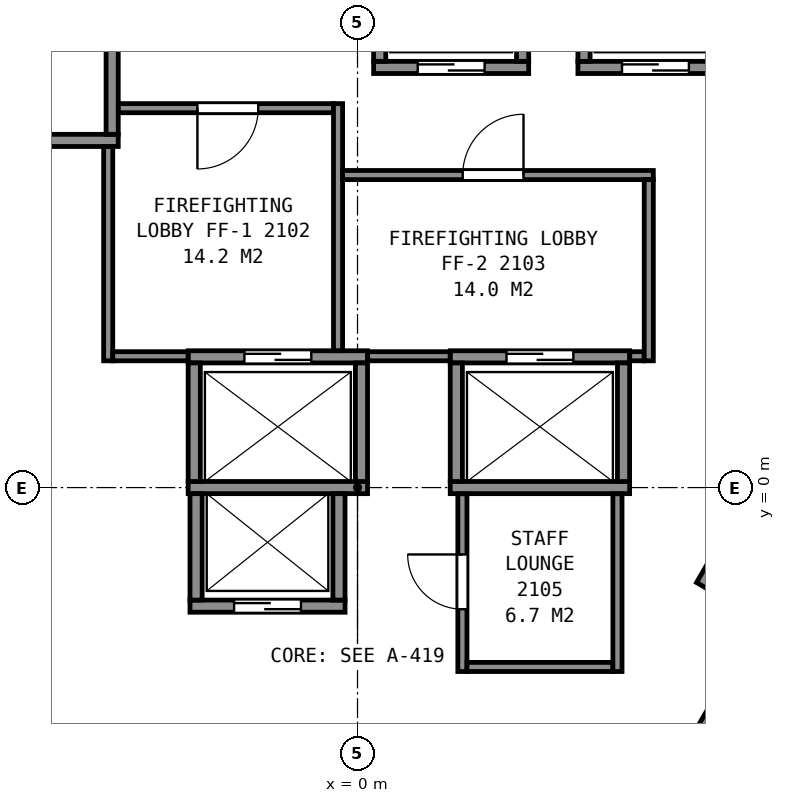
"""IFC4 building model, lengths in metres.
Left out: names, types, materials, properties, quantities, classifications, styles, units other than length and angle.
Written with IfcOpenShell. Run it as: python <this file> out.ifc"""

import sys

from ifc_helpers import new_model, si_unit, direction, frame, frame_2d, origin, place, context, subcontext, project, spatial, rectangle, extrude, element, fill, save


model = new_model("IFC4")
c1 = context("Model", 3, precision=1e-05, world=origin(), true_north=direction((0.0, 1.0)))
c2 = subcontext(c1, "Body", "Model", "MODEL_VIEW")
j1 = project(units=[si_unit("LENGTHUNIT", "METRE"), si_unit("PLANEANGLEUNIT", "RADIAN")], contexts=[c1])
p1 = place(None, origin())
s1 = spatial("IfcSite", under=j1, at=p1, CompositionType="ELEMENT")
p2 = place(p1, origin())
s2 = spatial("IfcBuilding", under=s1, at=p2, CompositionType="ELEMENT")
p3 = place(p2, frame((0.0, 0.0, 92.8)))
s3 = spatial("IfcBuildingStorey", under=s2, at=p3, CompositionType="ELEMENT", Elevation=92.8)
p4 = place(p3, frame((-2.755, -1.95, 0.0), z_axis=(0.0, 0.0, 1.0), x_axis=(1.0, 0.0, 0.0)))
e1 = element("IfcWall", 1, at=p4, inside=s3, PredefinedType="PARTITIONING", context=c2, shape_type="SweptSolid", body=[
    extrude(rectangle(XDim=2.55, YDim=0.2, at=frame_2d((1.275, 0.0))), origin(), (0.0, 0.0, 1.0), 3.6),
])
p5 = place(p4, frame((0.725, 0.0, 0.0)))
e2 = element("IfcOpeningElement", 2, at=p5, cuts=e1, PredefinedType="OPENING", context=c2, shape_type="SweptSolid", body=[
    extrude(rectangle(XDim=1.1, YDim=2.1, at=frame_2d((0.55, 1.05))), frame((0.0, 0.11, 0.0), z_axis=(0.0, -1.0, 0.0), x_axis=(1.0, 0.0, 0.0)), (0.0, 0.0, 1.0), 0.22),
])
p6 = place(p3, frame((-2.785, 0.0, 0.0), z_axis=(0.0, 0.0, 1.0), x_axis=(1.0, 0.0, 0.0)))
e3 = element("IfcWall", 3, at=p6, inside=s3, PredefinedType="PARTITIONING", context=c2, shape_type="SweptSolid", body=[
    extrude(rectangle(XDim=2.95, YDim=0.2, at=frame_2d((1.475, 0.0))), origin(), (0.0, 0.0, 1.0), 3.6),
])
p7 = place(p3, frame((1.525, 0.0, 0.0), z_axis=(0.0, 0.0, 1.0), x_axis=(1.0, 0.0, 0.0)))
e4 = element("IfcWall", 4, at=p7, inside=s3, PredefinedType="PARTITIONING", context=c2, shape_type="SweptSolid", body=[
    extrude(rectangle(XDim=2.95, YDim=0.2, at=frame_2d((1.475, 0.0))), origin(), (0.0, 0.0, 1.0), 3.6),
])
p8 = place(p3, frame((-2.785, 2.15, 0.0), z_axis=(0.0, 0.0, 1.0), x_axis=(1.0, 0.0, 0.0)))
e5 = element("IfcWall", 5, at=p8, inside=s3, PredefinedType="PARTITIONING", context=c2, shape_type="SweptSolid", body=[
    extrude(rectangle(XDim=2.95, YDim=0.2, at=frame_2d((1.475, 0.0))), origin(), (0.0, 0.0, 1.0), 3.6),
])
p9 = place(p8, frame((0.925, 0.0, 0.0)))
e6 = element("IfcOpeningElement", 6, at=p9, cuts=e5, PredefinedType="OPENING", context=c2, shape_type="SweptSolid", body=[
    extrude(rectangle(XDim=1.1, YDim=2.1, at=frame_2d((0.55, 1.05))), frame((0.0, 0.11, 0.0), z_axis=(0.0, -1.0, 0.0), x_axis=(1.0, 0.0, 0.0)), (0.0, 0.0, 1.0), 0.22),
])
p10 = place(p3, frame((1.525, 2.15, 0.0), z_axis=(0.0, 0.0, 1.0), x_axis=(1.0, 0.0, 0.0)))
e7 = element("IfcWall", 7, at=p10, inside=s3, PredefinedType="PARTITIONING", context=c2, shape_type="SweptSolid", body=[
    extrude(rectangle(XDim=2.95, YDim=0.2, at=frame_2d((1.475, 0.0))), origin(), (0.0, 0.0, 1.0), 3.6),
])
p11 = place(p10, frame((0.925, 0.0, 0.0)))
e8 = element("IfcOpeningElement", 8, at=p11, cuts=e7, PredefinedType="OPENING", context=c2, shape_type="SweptSolid", body=[
    extrude(rectangle(XDim=1.1, YDim=2.1, at=frame_2d((0.55, 1.05))), frame((0.0, 0.11, 0.0), z_axis=(0.0, -1.0, 0.0), x_axis=(1.0, 0.0, 0.0)), (0.0, 0.0, 1.0), 0.22),
])
p12 = place(p3, frame((-6.285, 5.71, 0.0), z_axis=(0.0, 0.0, 1.0), x_axis=(1.0, 0.0, 0.0)))
e9 = element("IfcWall", 9, at=p12, inside=s3, PredefinedType="PARTITIONING", context=c2, shape_type="SweptSolid", body=[
    extrude(rectangle(XDim=2.35, YDim=0.2, at=frame_2d((1.175, 0.0))), origin(), (0.0, 0.0, 1.0), 3.6),
])
p13 = place(p3, frame((0.265, 6.91, 0.0), z_axis=(0.0, 0.0, 1.0), x_axis=(1.0, 0.0, 0.0)))
e10 = element("IfcWall", 10, at=p13, inside=s3, PredefinedType="PARTITIONING", context=c2, shape_type="SweptSolid", body=[
    extrude(rectangle(XDim=2.55, YDim=0.2, at=frame_2d((1.275, 0.0))), origin(), (0.0, 0.0, 1.0), 3.6),
])
p14 = place(p13, frame((0.725, 0.0, 0.0)))
e11 = element("IfcOpeningElement", 11, at=p14, cuts=e10, PredefinedType="OPENING", context=c2, shape_type="SweptSolid", body=[
    extrude(rectangle(XDim=1.1, YDim=2.1, at=frame_2d((0.55, 1.05))), frame((0.0, 0.11, 0.0), z_axis=(0.0, -1.0, 0.0), x_axis=(1.0, 0.0, 0.0)), (0.0, 0.0, 1.0), 0.22),
])
p15 = place(p3, frame((3.625, 6.91, 0.0), z_axis=(0.0, 0.0, 1.0), x_axis=(1.0, 0.0, 0.0)))
e12 = element("IfcWall", 12, at=p15, inside=s3, PredefinedType="PARTITIONING", context=c2, shape_type="SweptSolid", body=[
    extrude(rectangle(XDim=2.55, YDim=0.2, at=frame_2d((1.275, 0.0))), origin(), (0.0, 0.0, 1.0), 3.6),
])
p16 = place(p15, frame((0.725, 0.0, 0.0)))
e13 = element("IfcOpeningElement", 13, at=p16, cuts=e12, PredefinedType="OPENING", context=c2, shape_type="SweptSolid", body=[
    extrude(rectangle(XDim=1.1, YDim=2.1, at=frame_2d((0.55, 1.05))), frame((0.0, 0.11, 0.0), z_axis=(0.0, -1.0, 0.0), x_axis=(1.0, 0.0, 0.0)), (0.0, 0.0, 1.0), 0.22),
])
p17 = place(p3, frame((5.527, -4.247, 0.0), z_axis=(0.0, 0.0, 1.0), x_axis=(0.499938297808, 0.866061024631, 0.0)))
e14 = element("IfcWall", 14, at=p17, inside=s3, PredefinedType="PARTITIONING", context=c2, shape_type="SweptSolid", body=[
    extrude(rectangle(XDim=2.35, YDim=0.2, at=frame_2d((1.175, 0.0))), origin(), (0.0, 0.0, 1.0), 3.6),
])
p18 = place(p17, frame((0.725, 0.0, 0.0)))
e15 = element("IfcOpeningElement", 15, at=p18, cuts=e14, PredefinedType="OPENING", context=c2, shape_type="SweptSolid", body=[
    extrude(rectangle(XDim=1.1, YDim=2.1, at=frame_2d((0.55, 1.05))), frame((0.0, 0.11, 0.0), z_axis=(0.0, -1.0, 0.0), x_axis=(1.0, 0.0, 0.0)), (0.0, 0.0, 1.0), 0.22),
])
p19 = place(p3, frame((5.663, -1.612, 0.0), z_axis=(0.0, 0.0, 1.0), x_axis=(0.49998122708, 0.866036242063, 0.0)))
e16 = element("IfcWall", 16, at=p19, inside=s3, PredefinedType="PARTITIONING", context=c2, shape_type="SweptSolid", body=[
    extrude(rectangle(XDim=4.9, YDim=0.2, at=frame_2d((2.45, 0.0))), origin(), (0.0, 0.0, 1.0), 3.6),
])
p20 = place(p3, frame((4.375, 0.1, 0.0), z_axis=(0.0, 0.0, 1.0), x_axis=(0.0, 1.0, 0.0)))
e17 = element("IfcWall", 17, at=p20, inside=s3, PredefinedType="PARTITIONING", context=c2, shape_type="SweptSolid", body=[
    extrude(rectangle(XDim=1.95, YDim=0.2, at=frame_2d((0.975, 0.0))), origin(), (0.0, 0.0, 1.0), 3.6),
])
for number, where, z_axis, x_axis in (
    (18, (3.725, 7.01, 0.0), (0.0, 0.0, 1.0), (0.0, 1.0, 0.0)),
    (19, (2.715, 7.01, 0.0), (0.0, 0.0, 1.0), (0.0, 1.0, 0.0)),
):
    element("IfcWall", number, at=place(p3, frame(where, z_axis=z_axis, x_axis=x_axis)), inside=s3, PredefinedType="PARTITIONING", context=c2, shape_type="SweptSolid", body=[
        extrude(rectangle(XDim=1.75, YDim=0.2, at=frame_2d((0.875, 0.0))), origin(), (0.0, 0.0, 1.0), 3.6),
    ])
p21 = place(p3, frame((1.625, 0.1, 0.0), z_axis=(0.0, 0.0, 1.0), x_axis=(0.0, 1.0, 0.0)))
e20 = element("IfcWall", 20, at=p21, inside=s3, PredefinedType="PARTITIONING", context=c2, shape_type="SweptSolid", body=[
    extrude(rectangle(XDim=1.95, YDim=0.2, at=frame_2d((0.975, 0.0))), origin(), (0.0, 0.0, 1.0), 3.6),
])
p22 = place(p3, frame((0.365, 7.01, 0.0), z_axis=(0.0, 0.0, 1.0), x_axis=(0.0, 1.0, 0.0)))
e21 = element("IfcWall", 21, at=p22, inside=s3, PredefinedType="PARTITIONING", context=c2, shape_type="SweptSolid", body=[
    extrude(rectangle(XDim=1.75, YDim=0.2, at=frame_2d((0.875, 0.0))), origin(), (0.0, 0.0, 1.0), 3.6),
])
p23 = place(p3, frame((0.065, 0.1, 0.0), z_axis=(0.0, 0.0, 1.0), x_axis=(0.0, 1.0, 0.0)))
e22 = element("IfcWall", 22, at=p23, inside=s3, PredefinedType="PARTITIONING", context=c2, shape_type="SweptSolid", body=[
    extrude(rectangle(XDim=1.95, YDim=0.2, at=frame_2d((0.975, 0.0))), origin(), (0.0, 0.0, 1.0), 3.6),
])
for number, where, z_axis, x_axis in (
    (23, (-0.305, -1.85, 0.0), (0.0, 0.0, 1.0), (0.0, 1.0, 0.0)),
    (24, (-2.655, -1.85, 0.0), (0.0, 0.0, 1.0), (0.0, 1.0, 0.0)),
):
    element("IfcWall", number, at=place(p3, frame(where, z_axis=z_axis, x_axis=x_axis)), inside=s3, PredefinedType="PARTITIONING", context=c2, shape_type="SweptSolid", body=[
        extrude(rectangle(XDim=1.75, YDim=0.2, at=frame_2d((0.875, 0.0))), origin(), (0.0, 0.0, 1.0), 3.6),
    ])
p24 = place(p3, frame((-2.685, 0.1, 0.0), z_axis=(0.0, 0.0, 1.0), x_axis=(0.0, 1.0, 0.0)))
e25 = element("IfcWall", 25, at=p24, inside=s3, PredefinedType="PARTITIONING", context=c2, shape_type="SweptSolid", body=[
    extrude(rectangle(XDim=1.95, YDim=0.2, at=frame_2d((0.975, 0.0))), origin(), (0.0, 0.0, 1.0), 3.6),
])
p25 = place(p3, frame((-4.035, 5.81, 0.0), z_axis=(0.0, 0.0, 1.0), x_axis=(0.0, 1.0, 0.0)))
e26 = element("IfcWall", 26, at=p25, inside=s3, PredefinedType="PARTITIONING", context=c2, shape_type="SweptSolid", body=[
    extrude(rectangle(XDim=1.75, YDim=0.2, at=frame_2d((0.875, 0.0))), origin(), (0.0, 0.0, 1.0), 3.6),
])
p26 = place(p3, frame((-13.664, 5.946, 0.0), z_axis=(0.0, 0.0, 1.0), x_axis=(0.499994327219, -0.866028678941, 0.0)))
e27 = element("IfcWall", 27, at=p26, inside=s3, PredefinedType="PARTITIONING", context=c2, shape_type="SweptSolid", body=[
    extrude(rectangle(XDim=23.968, YDim=0.2, at=frame_2d((11.984, 0.0))), origin(), (0.0, 0.0, 1.0), 3.35),
])
p27 = place(p3, frame((-4.278, -5.512, 0.0), z_axis=(0.0, 0.0, 1.0), x_axis=(-0.499933120428, 0.86606401328, 0.0)))
e28 = element("IfcWall", 28, at=p27, inside=s3, PredefinedType="PARTITIONING", context=c2, shape_type="SweptSolid", body=[
    extrude(rectangle(XDim=3.377, YDim=0.15, at=frame_2d((1.689, 0.0))), origin(), (0.0, 0.0, 1.0), 3.35),
])
p28 = place(p27, frame((2.177, 0.0, 0.0)))
e29 = element("IfcOpeningElement", 29, at=p28, cuts=e28, PredefinedType="OPENING", context=c2, shape_type="SweptSolid", body=[
    extrude(rectangle(XDim=0.9, YDim=2.1, at=frame_2d((0.45, 1.05))), frame((0.0, 0.085, 0.0), z_axis=(0.0, -1.0, 0.0), x_axis=(1.0, 0.0, 0.0)), (0.0, 0.0, 1.0), 0.17),
])
p29 = place(p27, frame((0.525, 0.0, 0.0)))
e30 = element("IfcOpeningElement", 30, at=p29, cuts=e28, PredefinedType="OPENING", context=c2, shape_type="SweptSolid", body=[
    extrude(rectangle(XDim=0.9, YDim=2.1, at=frame_2d((0.45, 1.05))), frame((0.0, 0.085, 0.0), z_axis=(0.0, -1.0, 0.0), x_axis=(1.0, 0.0, 0.0)), (0.0, 0.0, 1.0), 0.17),
])
p30 = place(p3, frame((-4.1, 2.085, 0.0), z_axis=(0.0, 0.0, 1.0), x_axis=(0.0, 1.0, 0.0)))
e31 = element("IfcWall", 31, at=p30, inside=s3, PredefinedType="PARTITIONING", context=c2, shape_type="SweptSolid", body=[
    extrude(rectangle(XDim=3.523, YDim=0.15, at=frame_2d((1.761, 0.0))), origin(), (0.0, 0.0, 1.0), 3.35),
])
p31 = place(p3, frame((-4.025, 2.16, 0.0), z_axis=(0.0, 0.0, 1.0), x_axis=(1.0, 0.0, 0.0)))
e32 = element("IfcWall", 32, at=p31, inside=s3, PredefinedType="PARTITIONING", context=c2, shape_type="SweptSolid", body=[
    extrude(rectangle(XDim=1.238, YDim=0.15, at=frame_2d((0.619, 0.0))), origin(), (0.0, 0.0, 1.0), 3.35),
])
p32 = place(p3, frame((-3.933, 6.24, 0.0), z_axis=(0.0, 0.0, 1.0), x_axis=(1.0, 0.0, 0.0)))
e33 = element("IfcWall", 33, at=p32, inside=s3, PredefinedType="PARTITIONING", context=c2, shape_type="SweptSolid", body=[
    extrude(rectangle(XDim=3.538, YDim=0.15, at=frame_2d((1.769, 0.0))), origin(), (0.0, 0.0, 1.0), 3.35),
])
p33 = place(p32, frame((1.3, 0.0, 0.0)))
e34 = element("IfcOpeningElement", 34, at=p33, cuts=e33, PredefinedType="OPENING", context=c2, shape_type="SweptSolid", body=[
    extrude(rectangle(XDim=1.0, YDim=2.1, at=frame_2d((0.5, 1.05))), frame((0.0, 0.085, 0.0), z_axis=(0.0, -1.0, 0.0), x_axis=(1.0, 0.0, 0.0)), (0.0, 0.0, 1.0), 0.17),
])
p34 = place(p3, frame((-0.32, 2.252, 0.0), z_axis=(0.0, 0.0, 1.0), x_axis=(0.0, 1.0, 0.0)))
e35 = element("IfcWall", 35, at=p34, inside=s3, PredefinedType="PARTITIONING", context=c2, shape_type="SweptSolid", body=[
    extrude(rectangle(XDim=4.063, YDim=0.15, at=frame_2d((2.031, 0.0))), origin(), (0.0, 0.0, 1.0), 3.35),
])
p35 = place(p3, frame((-0.245, 5.14, 0.0), z_axis=(0.0, 0.0, 1.0), x_axis=(1.0, 0.0, 0.0)))
e36 = element("IfcWall", 36, at=p35, inside=s3, PredefinedType="PARTITIONING", context=c2, shape_type="SweptSolid", body=[
    extrude(rectangle(XDim=5.11, YDim=0.15, at=frame_2d((2.555, 0.0))), origin(), (0.0, 0.0, 1.0), 3.35),
])
p36 = place(p35, frame((1.975, 0.0, 0.0)))
e37 = element("IfcOpeningElement", 37, at=p36, cuts=e36, PredefinedType="OPENING", context=c2, shape_type="SweptSolid", body=[
    extrude(rectangle(XDim=1.0, YDim=2.1, at=frame_2d((0.5, 1.05))), frame((0.0, 0.085, 0.0), z_axis=(0.0, -1.0, 0.0), x_axis=(1.0, 0.0, 0.0)), (0.0, 0.0, 1.0), 0.17),
])
p37 = place(p3, frame((0.167, 2.16, 0.0), z_axis=(0.0, 0.0, 1.0), x_axis=(1.0, 0.0, 0.0)))
e38 = element("IfcWall", 38, at=p37, inside=s3, PredefinedType="PARTITIONING", context=c2, shape_type="SweptSolid", body=[
    extrude(rectangle(XDim=1.356, YDim=0.15, at=frame_2d((0.678, 0.0))), origin(), (0.0, 0.0, 1.0), 3.35),
])
p38 = place(p3, frame((1.725, -0.102, 0.0), z_axis=(0.0, 0.0, 1.0), x_axis=(0.0, -1.0, 0.0)))
e39 = element("IfcWall", 39, at=p38, inside=s3, PredefinedType="PARTITIONING", context=c2, shape_type="SweptSolid", body=[
    extrude(rectangle(XDim=2.923, YDim=0.15, at=frame_2d((1.461, 0.0))), origin(), (0.0, 0.0, 1.0), 3.35),
])
p39 = place(p38, frame((0.998, 0.0, 0.0)))
e40 = element("IfcOpeningElement", 40, at=p39, cuts=e39, PredefinedType="OPENING", context=c2, shape_type="SweptSolid", body=[
    extrude(rectangle(XDim=0.9, YDim=2.1, at=frame_2d((0.45, 1.05))), frame((0.0, 0.085, 0.0), z_axis=(0.0, -1.0, 0.0), x_axis=(1.0, 0.0, 0.0)), (0.0, 0.0, 1.0), 0.17),
])
p40 = place(p3, frame((1.8, -2.95, 0.0), z_axis=(0.0, 0.0, 1.0), x_axis=(1.0, 0.0, 0.0)))
e41 = element("IfcWall", 41, at=p40, inside=s3, PredefinedType="PARTITIONING", context=c2, shape_type="SweptSolid", body=[
    extrude(rectangle(XDim=2.4, YDim=0.15, at=frame_2d((1.2, 0.0))), origin(), (0.0, 0.0, 1.0), 3.35),
])
p41 = place(p3, frame((4.275, -3.025, 0.0), z_axis=(0.0, 0.0, 1.0), x_axis=(0.0, 1.0, 0.0)))
e42 = element("IfcWall", 42, at=p41, inside=s3, PredefinedType="PARTITIONING", context=c2, shape_type="SweptSolid", body=[
    extrude(rectangle(XDim=2.923, YDim=0.15, at=frame_2d((1.461, 0.0))), origin(), (0.0, 0.0, 1.0), 3.35),
])
p42 = place(p3, frame((4.477, 2.16, 0.0), z_axis=(0.0, 0.0, 1.0), x_axis=(1.0, 0.0, 0.0)))
e43 = element("IfcWall", 43, at=p42, inside=s3, PredefinedType="PARTITIONING", context=c2, shape_type="SweptSolid", body=[
    extrude(rectangle(XDim=0.238, YDim=0.15, at=frame_2d((0.119, 0.0))), origin(), (0.0, 0.0, 1.0), 3.35),
])
p43 = place(p3, frame((4.79, 2.085, 0.0), z_axis=(0.0, 0.0, 1.0), x_axis=(0.0, 1.0, 0.0)))
e44 = element("IfcWall", 44, at=p43, inside=s3, PredefinedType="PARTITIONING", context=c2, shape_type="SweptSolid", body=[
    extrude(rectangle(XDim=2.98, YDim=0.15, at=frame_2d((1.49, 0.0))), origin(), (0.0, 0.0, 1.0), 3.35),
])
p44 = place(p14, origin())
e45 = element("IfcDoor", 45, at=p44, inside=s3, OperationType="SLIDING_TO_LEFT", PredefinedType="DOOR", context=c2, shape_type="SweptSolid", body=[
    extrude(rectangle(XDim=1.1, YDim=2.1, at=frame_2d((0.55, 1.05))), frame((0.0, 0.025, 0.0), z_axis=(0.0, -1.0, 0.0), x_axis=(1.0, 0.0, 0.0)), (0.0, 0.0, 1.0), 0.05),
])
fill(e11, e45)
p45 = place(p5, origin())
e46 = element("IfcDoor", 46, at=p45, inside=s3, OperationType="SLIDING_TO_RIGHT", PredefinedType="DOOR", context=c2, shape_type="SweptSolid", body=[
    extrude(rectangle(XDim=1.1, YDim=2.1, at=frame_2d((0.55, 1.05))), frame((0.0, 0.025, 0.0), z_axis=(0.0, -1.0, 0.0), x_axis=(1.0, 0.0, 0.0)), (0.0, 0.0, 1.0), 0.05),
])
fill(e2, e46)
p46 = place(p16, origin())
e47 = element("IfcDoor", 47, at=p46, inside=s3, OperationType="SLIDING_TO_LEFT", PredefinedType="DOOR", context=c2, shape_type="SweptSolid", body=[
    extrude(rectangle(XDim=1.1, YDim=2.1, at=frame_2d((0.55, 1.05))), frame((0.0, 0.025, 0.0), z_axis=(0.0, -1.0, 0.0), x_axis=(1.0, 0.0, 0.0)), (0.0, 0.0, 1.0), 0.05),
])
fill(e13, e47)
p47 = place(p9, origin())
e48 = element("IfcDoor", 48, at=p47, inside=s3, OperationType="SLIDING_TO_LEFT", PredefinedType="DOOR", context=c2, shape_type="SweptSolid", body=[
    extrude(rectangle(XDim=1.1, YDim=2.1, at=frame_2d((0.55, 1.05))), frame((0.0, 0.025, 0.0), z_axis=(0.0, -1.0, 0.0), x_axis=(1.0, 0.0, 0.0)), (0.0, 0.0, 1.0), 0.05),
])
fill(e6, e48)
p48 = place(p11, origin())
e49 = element("IfcDoor", 49, at=p48, inside=s3, OperationType="SLIDING_TO_RIGHT", PredefinedType="DOOR", context=c2, shape_type="SweptSolid", body=[
    extrude(rectangle(XDim=1.1, YDim=2.1, at=frame_2d((0.55, 1.05))), frame((0.0, 0.025, 0.0), z_axis=(0.0, -1.0, 0.0), x_axis=(1.0, 0.0, 0.0)), (0.0, 0.0, 1.0), 0.05),
])
fill(e8, e49)
p49 = place(p33, origin())
e50 = element("IfcDoor", 50, at=p49, inside=s3, OperationType="SINGLE_SWING_LEFT", PredefinedType="DOOR", context=c2, shape_type="SweptSolid", body=[
    extrude(rectangle(XDim=1.0, YDim=2.1, at=frame_2d((0.5, 1.05))), frame((0.0, 0.025, 0.0), z_axis=(0.0, -1.0, 0.0), x_axis=(1.0, 0.0, 0.0)), (0.0, 0.0, 1.0), 0.05),
])
fill(e34, e50)
p50 = place(p36, origin())
e51 = element("IfcDoor", 51, at=p50, inside=s3, OperationType="SINGLE_SWING_RIGHT", PredefinedType="DOOR", context=c2, shape_type="SweptSolid", body=[
    extrude(rectangle(XDim=1.0, YDim=2.1, at=frame_2d((0.5, 1.05))), frame((0.0, 0.025, 0.0), z_axis=(0.0, -1.0, 0.0), x_axis=(1.0, 0.0, 0.0)), (0.0, 0.0, 1.0), 0.05),
])
fill(e37, e51)
p51 = place(p39, origin())
e52 = element("IfcDoor", 52, at=p51, inside=s3, OperationType="SINGLE_SWING_LEFT", PredefinedType="DOOR", context=c2, shape_type="SweptSolid", body=[
    extrude(rectangle(XDim=0.9, YDim=2.1, at=frame_2d((0.45, 1.05))), frame((0.0, 0.025, 0.0), z_axis=(0.0, -1.0, 0.0), x_axis=(1.0, 0.0, 0.0)), (0.0, 0.0, 1.0), 0.05),
])
fill(e40, e52)
save(model, sys.argv[1])
